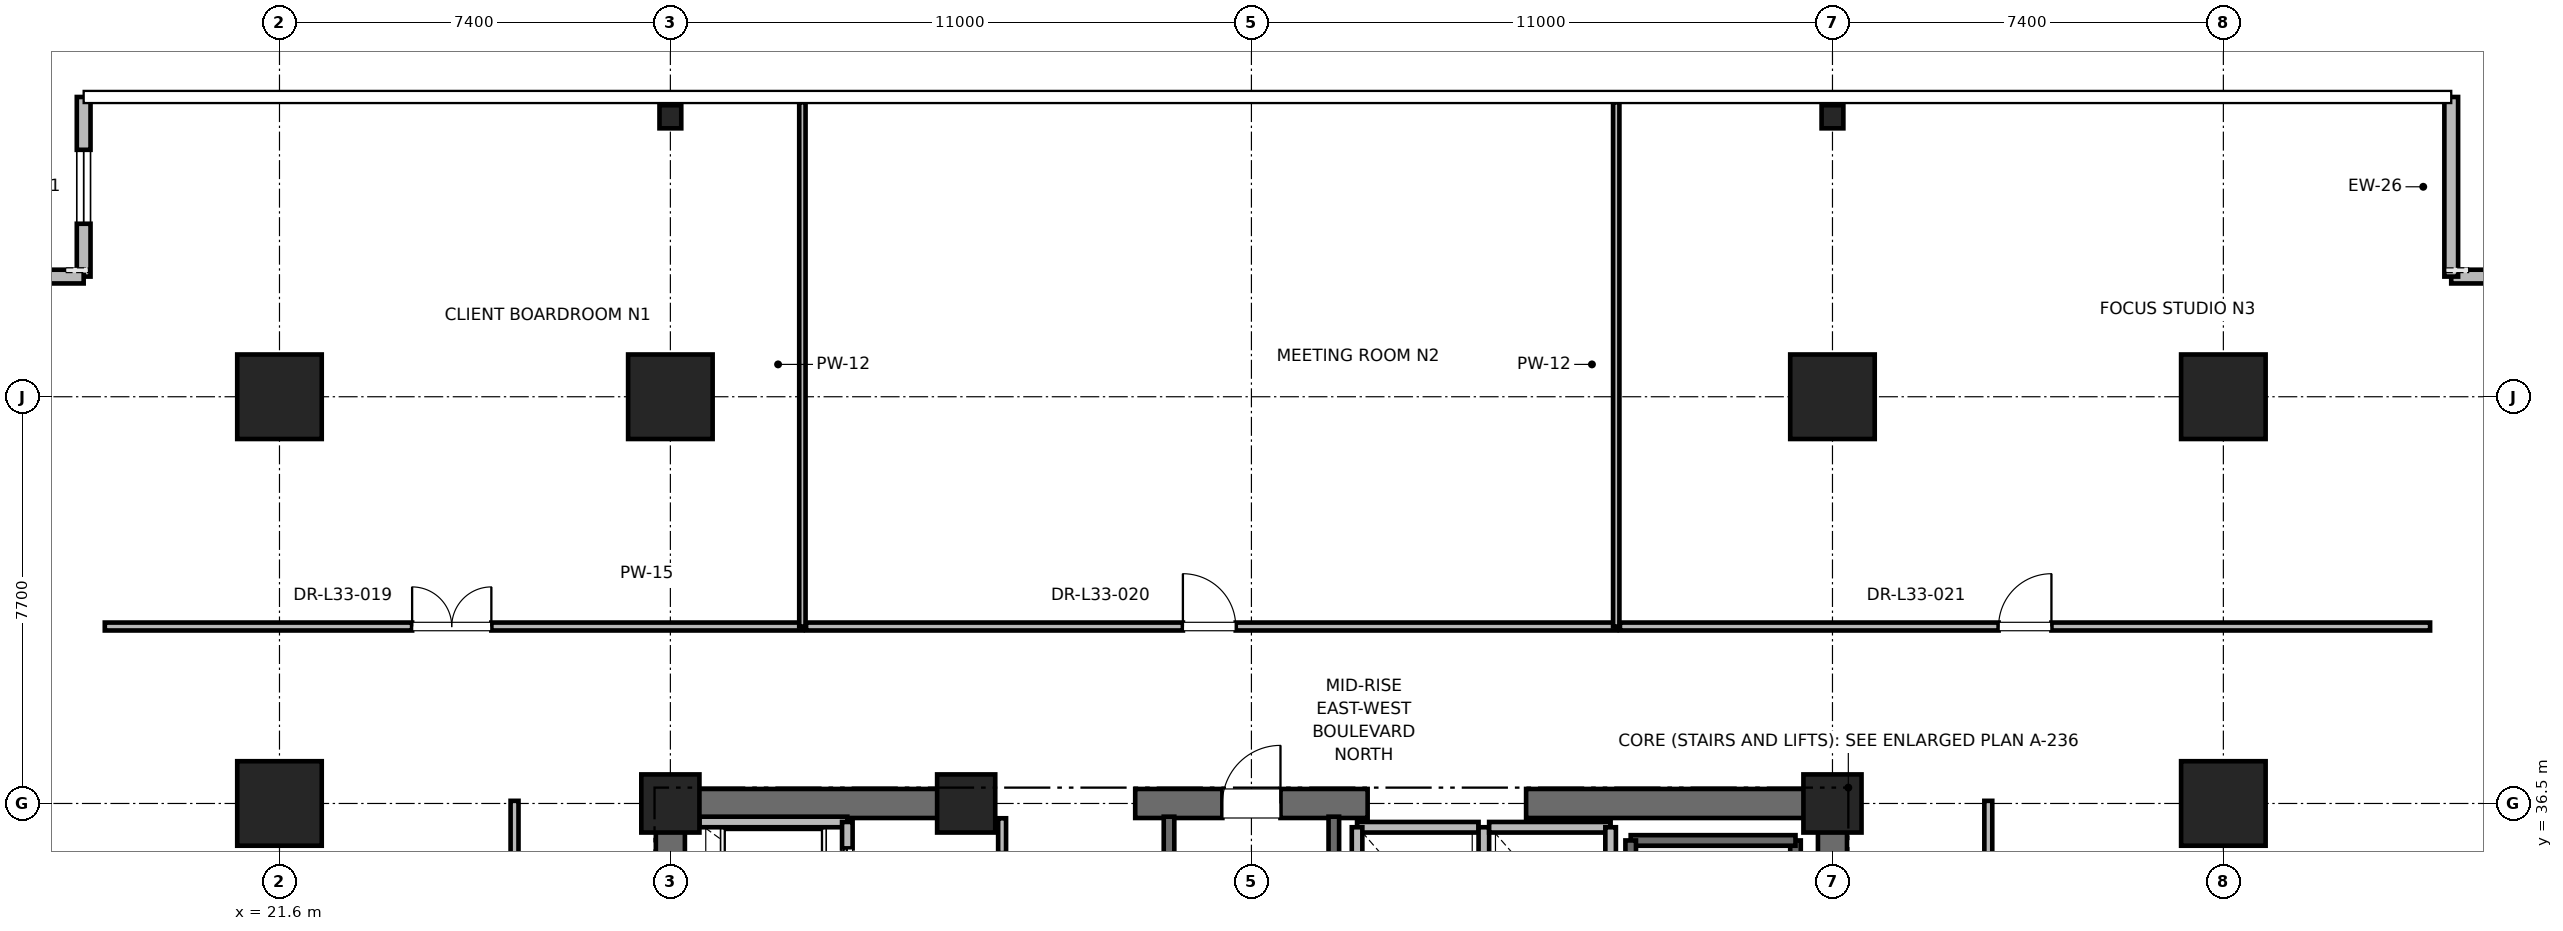
"""IFC4 building model, lengths in metres.
Left out: names, types, materials, properties, quantities, classifications, styles, units other than length and angle.
Written with IfcOpenShell. Run it as: python <this file> out.ifc"""

import sys

from ifc_helpers import new_model, si_unit, direction, frame, frame_2d, origin, origin_2d, place, context, subcontext, project, spatial, rectangle, i_section, extrude, element, fill, save


model = new_model("IFC4")
c1 = context("Model", 3, precision=1e-05, world=origin(), true_north=direction((0.0, 1.0)))
c2 = subcontext(c1, "Body", "Model", "MODEL_VIEW")
j1 = project(units=[si_unit("LENGTHUNIT", "METRE"), si_unit("PLANEANGLEUNIT", "RADIAN")], contexts=[c1])
p1 = place(None, origin())
s1 = spatial("IfcSite", under=j1, at=p1, CompositionType="ELEMENT")
p2 = place(p1, origin())
s2 = spatial("IfcBuilding", under=s1, at=p2, CompositionType="ELEMENT")
p3 = place(p2, frame((0.0, 0.0, 144.4)))
s3 = spatial("IfcBuildingStorey", under=s2, at=p3, CompositionType="ELEMENT", Elevation=144.4)
for number, where, z_axis, x_axis in (
    (1, (29.0, 44.2, 0.0), (0.0, 0.0, 1.0), (1.0, 0.0, 0.0)),
    (2, (51.0, 44.2, 0.0), (0.0, 0.0, 1.0), (1.0, 0.0, 0.0)),
    (3, (21.6, 36.5, 0.0), (0.0, 0.0, 1.0), (1.0, 0.0, 0.0)),
    (4, (58.4, 36.5, 0.0), (0.0, 0.0, 1.0), (1.0, 0.0, 0.0)),
    (5, (21.6, 44.2, 0.0), (0.0, 0.0, 1.0), (1.0, 0.0, 0.0)),
    (6, (58.4, 44.2, 0.0), (0.0, 0.0, 1.0), (1.0, 0.0, 0.0)),
):
    element("IfcColumn", number, at=place(p3, frame(where, z_axis=z_axis, x_axis=x_axis)), inside=s3, PredefinedType="COLUMN", context=c2, shape_type="SweptSolid", body=[
        extrude(rectangle(XDim=1.6, YDim=1.6, at=origin_2d()), origin(), (0.0, 0.0, 1.0), 4.0),
    ])
for number, where, z_axis, x_axis in (
    (7, (29.0, 49.5, 0.0), (0.0, 0.0, 1.0), (1.0, 0.0, 0.0)),
    (8, (51.0, 49.5, 0.0), (0.0, 0.0, 1.0), (1.0, 0.0, 0.0)),
):
    element("IfcColumn", number, at=place(p3, frame(where, z_axis=z_axis, x_axis=x_axis)), inside=s3, PredefinedType="COLUMN", context=c2, shape_type="SweptSolid", body=[
        extrude(i_section(OverallWidth=0.412, OverallDepth=0.437, WebThickness=0.036, FlangeThickness=0.058, FilletRadius=0.015, at=origin_2d()), origin(), (0.0, 0.0, 1.0), 4.0),
    ])
for number, where, z_axis, x_axis in (
    (9, (29.0, 36.5, 0.0), (0.0, 0.0, 1.0), (1.0, 0.0, 0.0)),
    (10, (51.0, 36.5, 0.0), (0.0, 0.0, 1.0), (1.0, 0.0, 0.0)),
    (11, (34.6, 36.5, 0.0), (0.0, 0.0, 1.0), (1.0, 0.0, 0.0)),
):
    element("IfcColumn", number, at=place(p3, frame(where, z_axis=z_axis, x_axis=x_axis)), inside=s3, PredefinedType="PILASTER", context=c2, shape_type="SweptSolid", body=[
        extrude(rectangle(XDim=1.1, YDim=1.1, at=origin_2d()), origin(), (0.0, 0.0, 1.0), 4.0),
    ])
p4 = place(p3, frame((29.0, 36.5, 0.0), z_axis=(0.0, 0.0, 1.0), x_axis=(1.0, 0.0, 0.0)))
e12 = element("IfcWall", 12, at=p4, inside=s3, PredefinedType="SHEAR", context=c2, shape_type="SweptSolid", body=[
    extrude(rectangle(XDim=5.8, YDim=0.55, at=frame_2d((2.9, 0.0))), origin(), (0.0, 0.0, 1.0), 3.775),
])
p5 = place(p3, frame((37.8, 36.5, 0.0), z_axis=(0.0, 0.0, 1.0), x_axis=(1.0, 0.0, 0.0)))
e13 = element("IfcWall", 13, at=p5, inside=s3, PredefinedType="SHEAR", context=c2, shape_type="SweptSolid", body=[
    extrude(rectangle(XDim=4.4, YDim=0.55, at=frame_2d((2.2, 0.0))), origin(), (0.0, 0.0, 1.0), 3.775),
])
p6 = place(p5, frame((1.65, 0.0, 0.0)))
e14 = element("IfcOpeningElement", 14, at=p6, cuts=e13, PredefinedType="OPENING", context=c2, shape_type="SweptSolid", body=[
    extrude(rectangle(XDim=1.1, YDim=2.15, at=frame_2d((0.55, 1.075))), frame((0.0, 0.275, 0.0), z_axis=(0.0, -1.0, 0.0), x_axis=(1.0, 0.0, 0.0)), (0.0, 0.0, 1.0), 0.55),
])
for number, where, z_axis, x_axis in (
    (15, (45.2, 36.5, 0.0), (0.0, 0.0, 1.0), (1.0, 0.0, 0.0)),
    (16, (29.0, 30.7, 0.0), (0.0, 0.0, 1.0), (0.0, 1.0, 0.0)),
):
    element("IfcWall", number, at=place(p3, frame(where, z_axis=z_axis, x_axis=x_axis)), inside=s3, PredefinedType="SHEAR", context=c2, shape_type="SweptSolid", body=[
        extrude(rectangle(XDim=5.8, YDim=0.55, at=frame_2d((2.9, 0.0))), origin(), (0.0, 0.0, 1.0), 3.775),
    ])
p7 = place(p3, frame((51.0, 27.7, 0.0), z_axis=(0.0, 0.0, 1.0), x_axis=(0.0, 1.0, 0.0)))
e17 = element("IfcWall", 17, at=p7, inside=s3, PredefinedType="SHEAR", context=c2, shape_type="SweptSolid", body=[
    extrude(rectangle(XDim=8.8, YDim=0.55, at=frame_2d((4.4, 0.0))), origin(), (0.0, 0.0, 1.0), 3.775),
])
p8 = place(p3, frame((66.514, 46.475, 0.0), z_axis=(0.0, 0.0, 1.0), x_axis=(-1.0, 0.0, 0.0)))
e18 = element("IfcWall", 18, at=p8, inside=s3, PredefinedType="PARAPET", context=c2, shape_type="SweptSolid", body=[
    extrude(rectangle(XDim=3.8, YDim=0.26, at=frame_2d((1.9, 0.0))), origin(), (0.0, 0.0, 1.0), 3.775),
])
p9 = place(p8, frame((1.2, 0.0, 0.85)))
e19 = element("IfcOpeningElement", 19, at=p9, cuts=e18, PredefinedType="OPENING", context=c2, shape_type="SweptSolid", body=[
    extrude(rectangle(XDim=1.4, YDim=2.0, at=frame_2d((0.7, 1.0))), frame((0.0, 0.13, 0.0), z_axis=(0.0, -1.0, 0.0), x_axis=(1.0, 0.0, 0.0)), (0.0, 0.0, 1.0), 0.26),
])
p10 = place(p3, frame((62.714, 46.475, 0.0), z_axis=(0.0, 0.0, 1.0), x_axis=(0.0, 1.0, 0.0)))
e20 = element("IfcWall", 20, at=p10, inside=s3, PredefinedType="PARAPET", context=c2, shape_type="SweptSolid", body=[
    extrude(rectangle(XDim=3.4, YDim=0.26, at=frame_2d((1.7, 0.0))), origin(), (0.0, 0.0, 1.0), 3.775),
])
p11 = place(p3, frame((17.893, 49.875, 0.0), z_axis=(0.0, 0.0, 1.0), x_axis=(0.0, -1.0, 0.0)))
e21 = element("IfcWall", 21, at=p11, inside=s3, PredefinedType="PARAPET", context=c2, shape_type="SweptSolid", body=[
    extrude(rectangle(XDim=3.4, YDim=0.26, at=frame_2d((1.7, 0.0))), origin(), (0.0, 0.0, 1.0), 3.775),
])
p12 = place(p11, frame((1.0, 0.0, 0.85)))
e22 = element("IfcOpeningElement", 22, at=p12, cuts=e21, PredefinedType="OPENING", context=c2, shape_type="SweptSolid", body=[
    extrude(rectangle(XDim=1.4, YDim=2.0, at=frame_2d((0.7, 1.0))), frame((0.0, 0.13, 0.0), z_axis=(0.0, -1.0, 0.0), x_axis=(1.0, 0.0, 0.0)), (0.0, 0.0, 1.0), 0.26),
])
p13 = place(p3, frame((17.893, 46.475, 0.0), z_axis=(0.0, 0.0, 1.0), x_axis=(-1.0, 0.0, 0.0)))
e23 = element("IfcWall", 23, at=p13, inside=s3, PredefinedType="PARAPET", context=c2, shape_type="SweptSolid", body=[
    extrude(rectangle(XDim=3.8, YDim=0.26, at=frame_2d((1.9, 0.0))), origin(), (0.0, 0.0, 1.0), 3.775),
])
p14 = place(p3, frame((50.3, 27.65, 0.0), z_axis=(0.0, 0.0, 1.0), x_axis=(0.0, 1.0, 0.0)))
e24 = element("IfcWall", 24, at=p14, inside=s3, PredefinedType="SOLIDWALL", context=c2, shape_type="SweptSolid", body=[
    extrude(rectangle(XDim=8.15, YDim=0.2, at=frame_2d((4.075, 0.0))), origin(), (0.0, 0.0, 1.0), 3.775),
])
p15 = place(p3, frame((47.18, 35.8, 0.0), z_axis=(0.0, 0.0, 1.0), x_axis=(1.0, 0.0, 0.0)))
e25 = element("IfcWall", 25, at=p15, inside=s3, PredefinedType="SOLIDWALL", context=c2, shape_type="SweptSolid", body=[
    extrude(rectangle(XDim=3.12, YDim=0.2, at=frame_2d((1.56, 0.0))), origin(), (0.0, 0.0, 1.0), 3.775),
])
p16 = place(p3, frame((47.18, 27.62, 0.0), z_axis=(0.0, 0.0, 1.0), x_axis=(0.0, 1.0, 0.0)))
e26 = element("IfcWall", 26, at=p16, inside=s3, PredefinedType="SOLIDWALL", context=c2, shape_type="SweptSolid", body=[
    extrude(rectangle(XDim=8.18, YDim=0.2, at=frame_2d((4.09, 0.0))), origin(), (0.0, 0.0, 1.0), 3.775),
])
p17 = place(p3, frame((38.44, 27.38, 0.0), z_axis=(0.0, 0.0, 1.0), x_axis=(0.0, 1.0, 0.0)))
e27 = element("IfcWall", 27, at=p17, inside=s3, PredefinedType="SOLIDWALL", context=c2, shape_type="SweptSolid", body=[
    extrude(rectangle(XDim=8.87, YDim=0.2, at=frame_2d((4.435, 0.0))), origin(), (0.0, 0.0, 1.0), 3.775),
])
p18 = place(p3, frame((41.56, 27.68, 0.0), z_axis=(0.0, 0.0, 1.0), x_axis=(0.0, 1.0, 0.0)))
e28 = element("IfcWall", 28, at=p18, inside=s3, PredefinedType="SOLIDWALL", context=c2, shape_type="SweptSolid", body=[
    extrude(rectangle(XDim=8.57, YDim=0.2, at=frame_2d((4.285, 0.0))), origin(), (0.0, 0.0, 1.0), 3.775),
])
p19 = place(p3, frame((32.35, 36.15, 0.0), z_axis=(0.0, 0.0, 1.0), x_axis=(-1.0, 0.0, 0.0)))
e29 = element("IfcWall", 29, at=p19, inside=s3, PredefinedType="SOLIDWALL", context=c2, shape_type="SweptSolid", body=[
    extrude(rectangle(XDim=2.8, YDim=0.2, at=frame_2d((1.4, 0.0))), origin(), (0.0, 0.0, 1.0), 2.985),
])
p20 = place(p3, frame((32.35, 34.05, 0.0), z_axis=(0.0, 0.0, 1.0), x_axis=(0.0, 1.0, 0.0)))
e30 = element("IfcWall", 30, at=p20, inside=s3, PredefinedType="SOLIDWALL", context=c2, shape_type="SweptSolid", body=[
    extrude(rectangle(XDim=2.1, YDim=0.2, at=frame_2d((1.05, 0.0))), origin(), (0.0, 0.0, 1.0), 3.775),
])
p21 = place(p20, frame((0.5, 0.0, 0.0)))
e31 = element("IfcOpeningElement", 31, at=p21, cuts=e30, PredefinedType="OPENING", context=c2, shape_type="SweptSolid", body=[
    extrude(rectangle(XDim=1.1, YDim=2.2, at=frame_2d((0.55, 1.1))), frame((0.0, 0.1, 0.0), z_axis=(0.0, -1.0, 0.0), x_axis=(1.0, 0.0, 0.0)), (0.0, 0.0, 1.0), 0.2),
])
p22 = place(p3, frame((44.3, 36.05, 0.0), z_axis=(0.0, 0.0, 1.0), x_axis=(-1.0, 0.0, 0.0)))
e32 = element("IfcWall", 32, at=p22, inside=s3, PredefinedType="SOLIDWALL", context=c2, shape_type="SweptSolid", body=[
    extrude(rectangle(XDim=2.3, YDim=0.2, at=frame_2d((1.15, 0.0))), origin(), (0.0, 0.0, 1.0), 2.755),
])
for number, where, z_axis, x_axis in (
    (33, (42.0, 36.05, 0.0), (0.0, 0.0, 1.0), (0.0, -1.0, 0.0)),
    (34, (44.4, 33.45, 0.0), (0.0, 0.0, 1.0), (0.0, 1.0, 0.0)),
):
    element("IfcWall", number, at=place(p3, frame(where, z_axis=z_axis, x_axis=x_axis)), inside=s3, PredefinedType="SOLIDWALL", context=c2, shape_type="SweptSolid", body=[
        extrude(rectangle(XDim=2.6, YDim=0.2, at=frame_2d((1.3, 0.0))), origin(), (0.0, 0.0, 1.0), 2.755),
    ])
p23 = place(p3, frame((46.8, 36.05, 0.0), z_axis=(0.0, 0.0, 1.0), x_axis=(-1.0, 0.0, 0.0)))
e35 = element("IfcWall", 35, at=p23, inside=s3, PredefinedType="SOLIDWALL", context=c2, shape_type="SweptSolid", body=[
    extrude(rectangle(XDim=2.3, YDim=0.2, at=frame_2d((1.15, 0.0))), origin(), (0.0, 0.0, 1.0), 2.755),
])
p24 = place(p3, frame((46.8, 33.45, 0.0), z_axis=(0.0, 0.0, 1.0), x_axis=(0.0, 1.0, 0.0)))
e36 = element("IfcWall", 36, at=p24, inside=s3, PredefinedType="SOLIDWALL", context=c2, shape_type="SweptSolid", body=[
    extrude(rectangle(XDim=2.6, YDim=0.2, at=frame_2d((1.3, 0.0))), origin(), (0.0, 0.0, 1.0), 3.775),
])
p25 = place(p3, frame((35.28, 33.95, 0.0), z_axis=(0.0, 0.0, 1.0), x_axis=(0.0, 1.0, 0.0)))
e37 = element("IfcWall", 37, at=p25, inside=s3, PredefinedType="PARTITIONING", context=c2, shape_type="SweptSolid", body=[
    extrude(rectangle(XDim=2.27, YDim=0.15, at=frame_2d((1.135, 0.0))), origin(), (0.0, 0.0, 1.0), 2.755),
])
p26 = place(p25, frame((0.66, 0.0, 0.0)))
e38 = element("IfcOpeningElement", 38, at=p26, cuts=e37, PredefinedType="OPENING", context=c2, shape_type="SweptSolid", body=[
    extrude(rectangle(XDim=0.95, YDim=2.15, at=frame_2d((0.475, 1.075))), frame((0.0, 0.075, 0.0), z_axis=(0.0, -1.0, 0.0), x_axis=(1.0, 0.0, 0.0)), (0.0, 0.0, 1.0), 0.15),
])
p27 = place(p3, frame((18.293, 39.85, 0.0), z_axis=(0.0, 0.0, 1.0), x_axis=(1.0, 0.0, 0.0)))
e39 = element("IfcWall", 39, at=p27, inside=s3, PredefinedType="PARTITIONING", context=c2, shape_type="SweptSolid", body=[
    extrude(rectangle(XDim=13.206, YDim=0.15, at=frame_2d((6.603, 0.0))), origin(), (0.0, 0.0, 1.0), 2.85),
])
p28 = place(p27, frame((5.818, 0.0, 0.0)))
e40 = element("IfcOpeningElement", 40, at=p28, cuts=e39, PredefinedType="OPENING", context=c2, shape_type="SweptSolid", body=[
    extrude(rectangle(XDim=1.5, YDim=2.25, at=frame_2d((0.75, 1.125))), frame((0.0, 0.075, 0.0), z_axis=(0.0, -1.0, 0.0), x_axis=(1.0, 0.0, 0.0)), (0.0, 0.0, 1.0), 0.15),
])
p29 = place(p3, frame((31.499, 39.85, 0.0), z_axis=(0.0, 0.0, 1.0), x_axis=(0.0, 1.0, 0.0)))
e41 = element("IfcWall", 41, at=p29, inside=s3, PredefinedType="PARTITIONING", context=c2, shape_type="SweptSolid", body=[
    extrude(rectangle(XDim=9.925, YDim=0.12, at=frame_2d((4.962, 0.0))), origin(), (0.0, 0.0, 1.0), 2.405),
])
p30 = place(p3, frame((31.569, 39.85, 0.0), z_axis=(0.0, 0.0, 1.0), x_axis=(1.0, 0.0, 0.0)))
e42 = element("IfcWall", 42, at=p30, inside=s3, PredefinedType="PARTITIONING", context=c2, shape_type="SweptSolid", body=[
    extrude(rectangle(XDim=15.337, YDim=0.15, at=frame_2d((7.669, 0.0))), origin(), (0.0, 0.0, 1.0), 2.85),
])
p31 = place(p30, frame((7.134, 0.0, 0.0)))
e43 = element("IfcOpeningElement", 43, at=p31, cuts=e42, PredefinedType="OPENING", context=c2, shape_type="SweptSolid", body=[
    extrude(rectangle(XDim=1.0, YDim=2.15, at=frame_2d((0.5, 1.075))), frame((0.0, 0.075, 0.0), z_axis=(0.0, -1.0, 0.0), x_axis=(1.0, 0.0, 0.0)), (0.0, 0.0, 1.0), 0.15),
])
p32 = place(p3, frame((46.906, 39.85, 0.0), z_axis=(0.0, 0.0, 1.0), x_axis=(0.0, 1.0, 0.0)))
e44 = element("IfcWall", 44, at=p32, inside=s3, PredefinedType="PARTITIONING", context=c2, shape_type="SweptSolid", body=[
    extrude(rectangle(XDim=9.925, YDim=0.12, at=frame_2d((4.962, 0.0))), origin(), (0.0, 0.0, 1.0), 2.405),
])
p33 = place(p3, frame((46.977, 39.85, 0.0), z_axis=(0.0, 0.0, 1.0), x_axis=(1.0, 0.0, 0.0)))
e45 = element("IfcWall", 45, at=p33, inside=s3, PredefinedType="PARTITIONING", context=c2, shape_type="SweptSolid", body=[
    extrude(rectangle(XDim=15.337, YDim=0.15, at=frame_2d((7.668, 0.0))), origin(), (0.0, 0.0, 1.0), 2.85),
])
p34 = place(p33, frame((7.169, 0.0, 0.0)))
e46 = element("IfcOpeningElement", 46, at=p34, cuts=e45, PredefinedType="OPENING", context=c2, shape_type="SweptSolid", body=[
    extrude(rectangle(XDim=1.0, YDim=2.15, at=frame_2d((0.5, 1.075))), frame((0.0, 0.075, 0.0), z_axis=(0.0, -1.0, 0.0), x_axis=(1.0, 0.0, 0.0)), (0.0, 0.0, 1.0), 0.15),
])
p35 = place(p3, frame((26.05, 18.45, 0.0), z_axis=(0.0, 0.0, 1.0), x_axis=(0.0, 1.0, 0.0)))
e47 = element("IfcWall", 47, at=p35, inside=s3, PredefinedType="PARTITIONING", context=c2, shape_type="SweptSolid", body=[
    extrude(rectangle(XDim=18.1, YDim=0.15, at=frame_2d((9.05, 0.0))), origin(), (0.0, 0.0, 1.0), 2.85),
])
p36 = place(p35, frame((8.55, 0.0, 0.0)))
e48 = element("IfcOpeningElement", 48, at=p36, cuts=e47, PredefinedType="OPENING", context=c2, shape_type="SweptSolid", body=[
    extrude(rectangle(XDim=1.0, YDim=2.15, at=frame_2d((0.5, 1.075))), frame((0.0, 0.075, 0.0), z_axis=(0.0, -1.0, 0.0), x_axis=(1.0, 0.0, 0.0)), (0.0, 0.0, 1.0), 0.15),
])
p37 = place(p3, frame((53.95, 30.828, 0.0), z_axis=(0.0, 0.0, 1.0), x_axis=(0.0, 1.0, 0.0)))
e49 = element("IfcWall", 49, at=p37, inside=s3, PredefinedType="PARTITIONING", context=c2, shape_type="SweptSolid", body=[
    extrude(rectangle(XDim=5.722, YDim=0.15, at=frame_2d((2.861, 0.0))), origin(), (0.0, 0.0, 1.0), 2.85),
])
p38 = place(p37, frame((2.036, 0.0, 0.0)))
e50 = element("IfcOpeningElement", 50, at=p38, cuts=e49, PredefinedType="OPENING", context=c2, shape_type="SweptSolid", body=[
    extrude(rectangle(XDim=1.5, YDim=2.25, at=frame_2d((0.75, 1.125))), frame((0.0, 0.075, 0.0), z_axis=(0.0, -1.0, 0.0), x_axis=(1.0, 0.0, 0.0)), (0.0, 0.0, 1.0), 0.15),
])
p39 = place(p12, origin())
e51 = element("IfcWindow", 51, at=p39, inside=s3, PartitioningType="SINGLE_PANEL", PredefinedType="WINDOW", context=c2, shape_type="SweptSolid", body=[
    extrude(rectangle(XDim=1.4, YDim=2.0, at=frame_2d((0.7, 1.0))), frame((0.0, 0.03, 0.0), z_axis=(0.0, -1.0, 0.0), x_axis=(1.0, 0.0, 0.0)), (0.0, 0.0, 1.0), 0.06),
])
fill(e22, e51)
p40 = place(p6, origin())
e52 = element("IfcDoor", 52, at=p40, inside=s3, OperationType="SINGLE_SWING_RIGHT", PredefinedType="DOOR", context=c2, shape_type="SweptSolid", body=[
    extrude(rectangle(XDim=1.1, YDim=2.15, at=frame_2d((0.55, 1.075))), frame((0.0, 0.025, 0.0), z_axis=(0.0, -1.0, 0.0), x_axis=(1.0, 0.0, 0.0)), (0.0, 0.0, 1.0), 0.05),
])
fill(e14, e52)
p41 = place(p21, origin())
e53 = element("IfcDoor", 53, at=p41, inside=s3, OperationType="SLIDING_TO_RIGHT", PredefinedType="DOOR", context=c2, shape_type="SweptSolid", body=[
    extrude(rectangle(XDim=1.1, YDim=2.2, at=frame_2d((0.55, 1.1))), frame((0.0, 0.025, 0.0), z_axis=(0.0, -1.0, 0.0), x_axis=(1.0, 0.0, 0.0)), (0.0, 0.0, 1.0), 0.05),
])
fill(e31, e53)
p42 = place(p28, origin())
e54 = element("IfcDoor", 54, at=p42, inside=s3, OperationType="DOUBLE_DOOR_SINGLE_SWING", PredefinedType="DOOR", context=c2, shape_type="SweptSolid", body=[
    extrude(rectangle(XDim=1.5, YDim=2.25, at=frame_2d((0.75, 1.125))), frame((0.0, 0.025, 0.0), z_axis=(0.0, -1.0, 0.0), x_axis=(1.0, 0.0, 0.0)), (0.0, 0.0, 1.0), 0.05),
])
fill(e40, e54)
p43 = place(p31, origin())
e55 = element("IfcDoor", 55, at=p43, inside=s3, OperationType="SINGLE_SWING_LEFT", PredefinedType="DOOR", context=c2, shape_type="SweptSolid", body=[
    extrude(rectangle(XDim=1.0, YDim=2.15, at=frame_2d((0.5, 1.075))), frame((0.0, 0.025, 0.0), z_axis=(0.0, -1.0, 0.0), x_axis=(1.0, 0.0, 0.0)), (0.0, 0.0, 1.0), 0.05),
])
fill(e43, e55)
p44 = place(p34, origin())
e56 = element("IfcDoor", 56, at=p44, inside=s3, OperationType="SINGLE_SWING_RIGHT", PredefinedType="DOOR", context=c2, shape_type="SweptSolid", body=[
    extrude(rectangle(XDim=1.0, YDim=2.15, at=frame_2d((0.5, 1.075))), frame((0.0, 0.025, 0.0), z_axis=(0.0, -1.0, 0.0), x_axis=(1.0, 0.0, 0.0)), (0.0, 0.0, 1.0), 0.05),
])
fill(e46, e56)
save(model, sys.argv[1])
